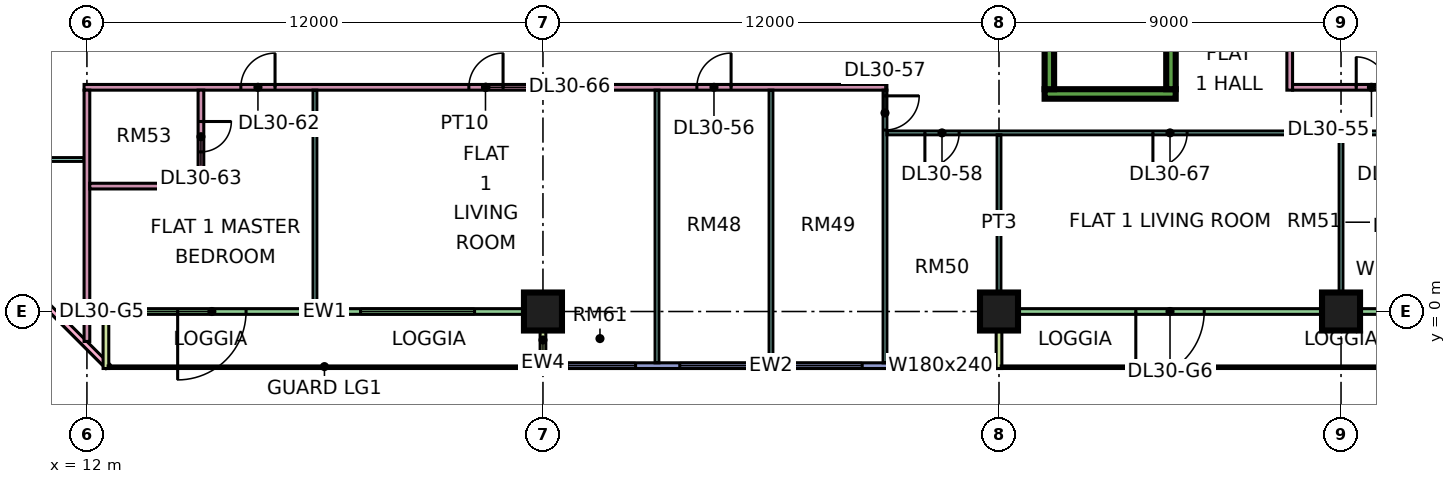
"""IFC4 building model, lengths in metres.
Left out: names, types, materials, properties, quantities, classifications, styles, units other than length and angle.
Written with IfcOpenShell. Run it as: python <this file> out.ifc"""

import sys

from ifc_helpers import new_model, si_unit, direction, frame, frame_2d, origin, origin_2d, place, context, subcontext, project, spatial, rectangle, extrude, element, fill, save


model = new_model("IFC4")
c1 = context("Model", 3, precision=1e-05, world=origin(), true_north=direction((0.0, 1.0)))
c2 = subcontext(c1, "Body", "Model", "MODEL_VIEW")
j1 = project(units=[si_unit("LENGTHUNIT", "METRE"), si_unit("PLANEANGLEUNIT", "RADIAN")], contexts=[c1])
p1 = place(None, origin())
s1 = spatial("IfcSite", under=j1, at=p1, CompositionType="ELEMENT")
p2 = place(p1, origin())
s2 = spatial("IfcBuilding", under=s1, at=p2, CompositionType="ELEMENT")
p3 = place(p2, frame((0.0, 0.0, 129.4)))
s3 = spatial("IfcBuildingStorey", under=s2, at=p3, CompositionType="ELEMENT", Elevation=129.4)
for number, where, z_axis, x_axis in (
    (1, (24.0, 0.0, 0.0), (0.0, 0.0, 1.0), (1.0, 0.0, 0.0)),
    (2, (36.0, 0.0, 0.0), (0.0, 0.0, 1.0), (1.0, 0.0, 0.0)),
    (3, (45.0, 0.0, 0.0), (0.0, 0.0, 1.0), (1.0, 0.0, 0.0)),
):
    element("IfcColumn", number, at=place(p3, frame(where, z_axis=z_axis, x_axis=x_axis)), inside=s3, PredefinedType="COLUMN", context=c2, shape_type="SweptSolid", body=[
        extrude(rectangle(XDim=1.0, YDim=1.0, at=origin_2d()), origin(), (0.0, 0.0, 1.0), 3.75),
    ])
p4 = place(p3, frame((37.2, 5.725, 0.0), z_axis=(0.0, 0.0, 1.0), x_axis=(1.0, 0.0, 0.0)))
e4 = element("IfcWall", 4, at=p4, inside=s3, PredefinedType="SHEAR", context=c2, shape_type="SweptSolid", body=[
    extrude(rectangle(XDim=3.45, YDim=0.25, at=frame_2d((1.725, 0.0))), origin(), (0.0, 0.0, 1.0), 3.75),
])
for number, where, z_axis, x_axis in (
    (5, (37.325, 5.85, 0.0), (0.0, 0.0, 1.0), (0.0, 1.0, 0.0)),
    (6, (40.525, 5.85, 0.0), (0.0, 0.0, 1.0), (0.0, 1.0, 0.0)),
):
    element("IfcWall", number, at=place(p3, frame(where, z_axis=z_axis, x_axis=x_axis)), inside=s3, PredefinedType="SHEAR", context=c2, shape_type="SweptSolid", body=[
        extrude(rectangle(XDim=6.5, YDim=0.25, at=frame_2d((3.25, 0.0))), origin(), (0.0, 0.0, 1.0), 3.75),
    ])
p5 = place(p3, frame((-1.447, 12.553, 0.0), z_axis=(0.0, 0.0, 1.0), x_axis=(0.707106781187, -0.707106781187, 0.0)))
e7 = element("IfcWall", 7, at=p5, inside=s3, PredefinedType="SOLIDWALL", context=c2, shape_type="SweptSolid", body=[
    extrude(rectangle(XDim=19.799, YDim=0.15, at=frame_2d((9.899, 0.0))), origin(), (0.0, 0.0, 1.0), 3.35),
])
p6 = place(p5, frame((2.212, 0.0, 0.45)))
e8 = element("IfcOpeningElement", 8, at=p6, cuts=e7, PredefinedType="OPENING", context=c2, shape_type="SweptSolid", body=[
    extrude(rectangle(XDim=3.0, YDim=2.4, at=frame_2d((1.5, 1.2))), frame((0.0, 0.085, 0.0), z_axis=(0.0, -1.0, 0.0), x_axis=(1.0, 0.0, 0.0)), (0.0, 0.0, 1.0), 0.17),
])
p7 = place(p5, frame((10.216, 0.0, 0.45)))
e9 = element("IfcOpeningElement", 9, at=p7, cuts=e7, PredefinedType="OPENING", context=c2, shape_type="SweptSolid", body=[
    extrude(rectangle(XDim=3.0, YDim=2.4, at=frame_2d((1.5, 1.2))), frame((0.0, 0.085, 0.0), z_axis=(0.0, -1.0, 0.0), x_axis=(1.0, 0.0, 0.0)), (0.0, 0.0, 1.0), 0.17),
])
p8 = place(p3, frame((12.575, 0.0, 0.0), z_axis=(0.0, 0.0, 1.0), x_axis=(1.0, 0.0, 0.0)))
e10 = element("IfcWall", 10, at=p8, inside=s3, PredefinedType="SOLIDWALL", context=c2, shape_type="SweptSolid", body=[
    extrude(rectangle(XDim=11.35, YDim=0.15, at=frame_2d((5.675, 0.0))), origin(), (0.0, 0.0, 1.0), 3.35),
])
p9 = place(p8, frame((1.812, 0.0, 0.0)))
e11 = element("IfcOpeningElement", 11, at=p9, cuts=e10, PredefinedType="OPENING", context=c2, shape_type="SweptSolid", body=[
    extrude(rectangle(XDim=1.8, YDim=2.4, at=frame_2d((0.9, 1.2))), frame((0.0, 0.085, 0.0), z_axis=(0.0, -1.0, 0.0), x_axis=(1.0, 0.0, 0.0)), (0.0, 0.0, 1.0), 0.17),
])
p10 = place(p8, frame((6.625, 0.0, 0.45)))
e12 = element("IfcOpeningElement", 12, at=p10, cuts=e10, PredefinedType="OPENING", context=c2, shape_type="SweptSolid", body=[
    extrude(rectangle(XDim=3.0, YDim=2.4, at=frame_2d((1.5, 1.2))), frame((0.0, 0.085, 0.0), z_axis=(0.0, -1.0, 0.0), x_axis=(1.0, 0.0, 0.0)), (0.0, 0.0, 1.0), 0.17),
])
for number, where, z_axis, x_axis in (
    (13, (12.5, -1.5, 0.0), (0.0, 0.0, 1.0), (0.0, 1.0, 0.0)),
    (14, (24.0, -1.5, 0.0), (0.0, 0.0, 1.0), (0.0, 1.0, 0.0)),
):
    element("IfcWall", number, at=place(p3, frame(where, z_axis=z_axis, x_axis=x_axis)), inside=s3, PredefinedType="SOLIDWALL", context=c2, shape_type="SweptSolid", body=[
        extrude(rectangle(XDim=1.5, YDim=0.15, at=frame_2d((0.75, 0.0))), origin(), (0.0, 0.0, 1.0), 3.35),
    ])
p11 = place(p3, frame((24.075, -1.425, 0.0), z_axis=(0.0, 0.0, 1.0), x_axis=(1.0, 0.0, 0.0)))
e15 = element("IfcWall", 15, at=p11, inside=s3, PredefinedType="SOLIDWALL", context=c2, shape_type="SweptSolid", body=[
    extrude(rectangle(XDim=11.85, YDim=0.15, at=frame_2d((5.925, 0.0))), origin(), (0.0, 0.0, 1.0), 3.35),
])
p12 = place(p11, frame((0.562, 0.0, 0.45)))
e16 = element("IfcOpeningElement", 16, at=p12, cuts=e15, PredefinedType="OPENING", context=c2, shape_type="SweptSolid", body=[
    extrude(rectangle(XDim=1.8, YDim=2.4, at=frame_2d((0.9, 1.2))), frame((0.0, 0.085, 0.0), z_axis=(0.0, -1.0, 0.0), x_axis=(1.0, 0.0, 0.0)), (0.0, 0.0, 1.0), 0.17),
])
p13 = place(p11, frame((3.525, 0.0, 0.45)))
e17 = element("IfcOpeningElement", 17, at=p13, cuts=e15, PredefinedType="OPENING", context=c2, shape_type="SweptSolid", body=[
    extrude(rectangle(XDim=1.8, YDim=2.4, at=frame_2d((0.9, 1.2))), frame((0.0, 0.085, 0.0), z_axis=(0.0, -1.0, 0.0), x_axis=(1.0, 0.0, 0.0)), (0.0, 0.0, 1.0), 0.17),
])
p14 = place(p11, frame((6.525, 0.0, 0.45)))
e18 = element("IfcOpeningElement", 18, at=p14, cuts=e15, PredefinedType="OPENING", context=c2, shape_type="SweptSolid", body=[
    extrude(rectangle(XDim=1.8, YDim=2.4, at=frame_2d((0.9, 1.2))), frame((0.0, 0.085, 0.0), z_axis=(0.0, -1.0, 0.0), x_axis=(1.0, 0.0, 0.0)), (0.0, 0.0, 1.0), 0.17),
])
p15 = place(p11, frame((9.488, 0.0, 0.45)))
e19 = element("IfcOpeningElement", 19, at=p15, cuts=e15, PredefinedType="OPENING", context=c2, shape_type="SweptSolid", body=[
    extrude(rectangle(XDim=1.8, YDim=2.4, at=frame_2d((0.9, 1.2))), frame((0.0, 0.085, 0.0), z_axis=(0.0, -1.0, 0.0), x_axis=(1.0, 0.0, 0.0)), (0.0, 0.0, 1.0), 0.17),
])
p16 = place(p3, frame((36.075, 0.0, 0.0), z_axis=(0.0, 0.0, 1.0), x_axis=(1.0, 0.0, 0.0)))
e20 = element("IfcWall", 20, at=p16, inside=s3, PredefinedType="SOLIDWALL", context=c2, shape_type="SweptSolid", body=[
    extrude(rectangle(XDim=11.85, YDim=0.15, at=frame_2d((5.925, 0.0))), origin(), (0.0, 0.0, 1.0), 3.35),
])
p17 = place(p16, frame((3.525, 0.0, 0.0)))
e21 = element("IfcOpeningElement", 21, at=p17, cuts=e20, PredefinedType="OPENING", context=c2, shape_type="SweptSolid", body=[
    extrude(rectangle(XDim=1.8, YDim=2.4, at=frame_2d((0.9, 1.2))), frame((0.0, 0.085, 0.0), z_axis=(0.0, -1.0, 0.0), x_axis=(1.0, 0.0, 0.0)), (0.0, 0.0, 1.0), 0.17),
])
p18 = place(p16, frame((10.087, 0.0, 0.45)))
e22 = element("IfcOpeningElement", 22, at=p18, cuts=e20, PredefinedType="OPENING", context=c2, shape_type="SweptSolid", body=[
    extrude(rectangle(XDim=1.2, YDim=2.4, at=frame_2d((0.6, 1.2))), frame((0.0, 0.085, 0.0), z_axis=(0.0, -1.0, 0.0), x_axis=(1.0, 0.0, 0.0)), (0.0, 0.0, 1.0), 0.17),
])
p19 = place(p3, frame((36.0, -1.5, 0.0), z_axis=(0.0, 0.0, 1.0), x_axis=(0.0, 1.0, 0.0)))
e23 = element("IfcWall", 23, at=p19, inside=s3, PredefinedType="SOLIDWALL", context=c2, shape_type="SweptSolid", body=[
    extrude(rectangle(XDim=1.5, YDim=0.15, at=frame_2d((0.75, 0.0))), origin(), (0.0, 0.0, 1.0), 3.35),
])
p20 = place(p3, frame((9.05, 4.0, 0.0), z_axis=(0.0, 0.0, 1.0), x_axis=(1.0, 0.0, 0.0)))
e24 = element("IfcWall", 24, at=p20, inside=s3, PredefinedType="PARTITIONING", context=c2, shape_type="SweptSolid", body=[
    extrude(rectangle(XDim=2.875, YDim=0.1, at=frame_2d((1.438, 0.0))), origin(), (0.0, 0.0, 1.0), 3.35),
])
p21 = place(p3, frame((11.925, 5.9, 0.0), z_axis=(0.0, 0.0, 1.0), x_axis=(1.0, 0.0, 0.0)))
e25 = element("IfcWall", 25, at=p21, inside=s3, PredefinedType="PARTITIONING", context=c2, shape_type="SweptSolid", body=[
    extrude(rectangle(XDim=21.125, YDim=0.15, at=frame_2d((10.562, 0.0))), origin(), (0.0, 0.0, 1.0), 3.35),
])
p22 = place(p21, frame((16.125, 0.0, 0.0)))
e26 = element("IfcOpeningElement", 26, at=p22, cuts=e25, PredefinedType="OPENING", context=c2, shape_type="SweptSolid", body=[
    extrude(rectangle(XDim=0.9, YDim=2.1, at=frame_2d((0.45, 1.05))), frame((0.0, 0.085, 0.0), z_axis=(0.0, -1.0, 0.0), x_axis=(1.0, 0.0, 0.0)), (0.0, 0.0, 1.0), 0.17),
])
p23 = place(p21, frame((4.125, 0.0, 0.0)))
e27 = element("IfcOpeningElement", 27, at=p23, cuts=e25, PredefinedType="OPENING", context=c2, shape_type="SweptSolid", body=[
    extrude(rectangle(XDim=0.9, YDim=2.1, at=frame_2d((0.45, 1.05))), frame((0.0, 0.085, 0.0), z_axis=(0.0, -1.0, 0.0), x_axis=(1.0, 0.0, 0.0)), (0.0, 0.0, 1.0), 0.17),
])
p24 = place(p21, frame((10.125, 0.0, 0.0)))
e28 = element("IfcOpeningElement", 28, at=p24, cuts=e25, PredefinedType="OPENING", context=c2, shape_type="SweptSolid", body=[
    extrude(rectangle(XDim=0.9, YDim=2.1, at=frame_2d((0.45, 1.05))), frame((0.0, 0.085, 0.0), z_axis=(0.0, -1.0, 0.0), x_axis=(1.0, 0.0, 0.0)), (0.0, 0.0, 1.0), 0.17),
])
p25 = place(p3, frame((12.0, -0.788, 0.0), z_axis=(0.0, 0.0, 1.0), x_axis=(0.0, 1.0, 0.0)))
e29 = element("IfcWall", 29, at=p25, inside=s3, PredefinedType="PARTITIONING", context=c2, shape_type="SweptSolid", body=[
    extrude(rectangle(XDim=6.613, YDim=0.15, at=frame_2d((3.306, 0.0))), origin(), (0.0, 0.0, 1.0), 3.35),
])
p26 = place(p3, frame((12.075, 3.3, 0.0), z_axis=(0.0, 0.0, 1.0), x_axis=(1.0, 0.0, 0.0)))
e30 = element("IfcWall", 30, at=p26, inside=s3, PredefinedType="PARTITIONING", context=c2, shape_type="SweptSolid", body=[
    extrude(rectangle(XDim=3.0, YDim=0.15, at=frame_2d((1.5, 0.0))), origin(), (0.0, 0.0, 1.0), 3.35),
])
p27 = place(p3, frame((15.0, 3.375, 0.0), z_axis=(0.0, 0.0, 1.0), x_axis=(0.0, 1.0, 0.0)))
e31 = element("IfcWall", 31, at=p27, inside=s3, PredefinedType="PARTITIONING", context=c2, shape_type="SweptSolid", body=[
    extrude(rectangle(XDim=2.45, YDim=0.15, at=frame_2d((1.225, 0.0))), origin(), (0.0, 0.0, 1.0), 3.35),
])
p28 = place(p27, frame((0.825, 0.0, 0.0)))
e32 = element("IfcOpeningElement", 32, at=p28, cuts=e31, PredefinedType="OPENING", context=c2, shape_type="SweptSolid", body=[
    extrude(rectangle(XDim=0.8, YDim=2.1, at=frame_2d((0.4, 1.05))), frame((0.0, 0.085, 0.0), z_axis=(0.0, -1.0, 0.0), x_axis=(1.0, 0.0, 0.0)), (0.0, 0.0, 1.0), 0.17),
])
p29 = place(p3, frame((18.0, 0.074, 0.0), z_axis=(0.0, 0.0, 1.0), x_axis=(0.0, 1.0, 0.0)))
e33 = element("IfcWall", 33, at=p29, inside=s3, PredefinedType="PARTITIONING", context=c2, shape_type="SweptSolid", body=[
    extrude(rectangle(XDim=5.751, YDim=0.1, at=frame_2d((2.875, 0.0))), origin(), (0.0, 0.0, 1.0), 3.35),
])
p30 = place(p3, frame((27.0, -1.35, 0.0), z_axis=(0.0, 0.0, 1.0), x_axis=(0.0, 1.0, 0.0)))
e34 = element("IfcWall", 34, at=p30, inside=s3, PredefinedType="PARTITIONING", context=c2, shape_type="SweptSolid", body=[
    extrude(rectangle(XDim=7.175, YDim=0.1, at=frame_2d((3.587, 0.0))), origin(), (0.0, 0.0, 1.0), 3.35),
])
p31 = place(p3, frame((30.0, -1.351, 0.0), z_axis=(0.0, 0.0, 1.0), x_axis=(0.0, 1.0, 0.0)))
e35 = element("IfcWall", 35, at=p31, inside=s3, PredefinedType="PARTITIONING", context=c2, shape_type="SweptSolid", body=[
    extrude(rectangle(XDim=7.176, YDim=0.1, at=frame_2d((3.588, 0.0))), origin(), (0.0, 0.0, 1.0), 3.35),
])
p32 = place(p3, frame((33.0, -1.351, 0.0), z_axis=(0.0, 0.0, 1.0), x_axis=(0.0, 1.0, 0.0)))
e36 = element("IfcWall", 36, at=p32, inside=s3, PredefinedType="PARTITIONING", context=c2, shape_type="SweptSolid", body=[
    extrude(rectangle(XDim=7.176, YDim=0.1, at=frame_2d((3.588, 0.0))), origin(), (0.0, 0.0, 1.0), 3.35),
])
p33 = place(p32, frame((6.126, 0.0, 0.0)))
e37 = element("IfcOpeningElement", 37, at=p33, cuts=e36, PredefinedType="OPENING", context=c2, shape_type="SweptSolid", body=[
    extrude(rectangle(XDim=0.9, YDim=2.1, at=frame_2d((0.45, 1.05))), frame((0.0, 0.06, 0.0), z_axis=(0.0, -1.0, 0.0), x_axis=(1.0, 0.0, 0.0)), (0.0, 0.0, 1.0), 0.12),
])
p34 = place(p3, frame((33.05, 4.7, 0.0), z_axis=(0.0, 0.0, 1.0), x_axis=(1.0, 0.0, 0.0)))
e38 = element("IfcWall", 38, at=p34, inside=s3, PredefinedType="PARTITIONING", context=c2, shape_type="SweptSolid", body=[
    extrude(rectangle(XDim=14.85, YDim=0.1, at=frame_2d((7.425, 0.0))), origin(), (0.0, 0.0, 1.0), 3.35),
])
p35 = place(p34, frame((1.0, 0.0, 0.0)))
e39 = element("IfcOpeningElement", 39, at=p35, cuts=e38, PredefinedType="OPENING", context=c2, shape_type="SweptSolid", body=[
    extrude(rectangle(XDim=0.9, YDim=2.1, at=frame_2d((0.45, 1.05))), frame((0.0, 0.06, 0.0), z_axis=(0.0, -1.0, 0.0), x_axis=(1.0, 0.0, 0.0)), (0.0, 0.0, 1.0), 0.12),
])
p36 = place(p34, frame((13.0, 0.0, 0.0)))
e40 = element("IfcOpeningElement", 40, at=p36, cuts=e38, PredefinedType="OPENING", context=c2, shape_type="SweptSolid", body=[
    extrude(rectangle(XDim=0.9, YDim=2.1, at=frame_2d((0.45, 1.05))), frame((0.0, 0.06, 0.0), z_axis=(0.0, -1.0, 0.0), x_axis=(1.0, 0.0, 0.0)), (0.0, 0.0, 1.0), 0.12),
])
p37 = place(p34, frame((7.0, 0.0, 0.0)))
e41 = element("IfcOpeningElement", 41, at=p37, cuts=e38, PredefinedType="OPENING", context=c2, shape_type="SweptSolid", body=[
    extrude(rectangle(XDim=0.9, YDim=2.1, at=frame_2d((0.45, 1.05))), frame((0.0, 0.06, 0.0), z_axis=(0.0, -1.0, 0.0), x_axis=(1.0, 0.0, 0.0)), (0.0, 0.0, 1.0), 0.12),
])
p38 = place(p3, frame((36.0, 0.0, 0.0), z_axis=(0.0, 0.0, 1.0), x_axis=(0.0, 1.0, 0.0)))
e42 = element("IfcWall", 42, at=p38, inside=s3, PredefinedType="PARTITIONING", context=c2, shape_type="SweptSolid", body=[
    extrude(rectangle(XDim=4.65, YDim=0.1, at=frame_2d((2.325, 0.0))), origin(), (0.0, 0.0, 1.0), 3.35),
])
p39 = place(p3, frame((43.65, 5.825, 0.0), z_axis=(0.0, 0.0, 1.0), x_axis=(0.0, 1.0, 0.0)))
e43 = element("IfcWall", 43, at=p39, inside=s3, PredefinedType="PARTITIONING", context=c2, shape_type="SweptSolid", body=[
    extrude(rectangle(XDim=6.575, YDim=0.15, at=frame_2d((3.288, 0.0))), origin(), (0.0, 0.0, 1.0), 3.35),
])
p40 = place(p39, frame((4.425, 0.0, 0.0)))
e44 = element("IfcOpeningElement", 44, at=p40, cuts=e43, PredefinedType="OPENING", context=c2, shape_type="SweptSolid", body=[
    extrude(rectangle(XDim=0.9, YDim=2.1, at=frame_2d((0.45, 1.05))), frame((0.0, 0.085, 0.0), z_axis=(0.0, -1.0, 0.0), x_axis=(1.0, 0.0, 0.0)), (0.0, 0.0, 1.0), 0.17),
])
p41 = place(p3, frame((43.725, 5.9, 0.0), z_axis=(0.0, 0.0, 1.0), x_axis=(1.0, 0.0, 0.0)))
e45 = element("IfcWall", 45, at=p41, inside=s3, PredefinedType="PARTITIONING", context=c2, shape_type="SweptSolid", body=[
    extrude(rectangle(XDim=4.175, YDim=0.15, at=frame_2d((2.087, 0.0))), origin(), (0.0, 0.0, 1.0), 3.35),
])
p42 = place(p41, frame((1.675, 0.0, 0.0)))
e46 = element("IfcOpeningElement", 46, at=p42, cuts=e45, PredefinedType="OPENING", context=c2, shape_type="SweptSolid", body=[
    extrude(rectangle(XDim=0.8, YDim=2.1, at=frame_2d((0.4, 1.05))), frame((0.0, 0.085, 0.0), z_axis=(0.0, -1.0, 0.0), x_axis=(1.0, 0.0, 0.0)), (0.0, 0.0, 1.0), 0.17),
])
p43 = place(p3, frame((45.0, 0.074, 0.0), z_axis=(0.0, 0.0, 1.0), x_axis=(0.0, 1.0, 0.0)))
e47 = element("IfcWall", 47, at=p43, inside=s3, PredefinedType="PARTITIONING", context=c2, shape_type="SweptSolid", body=[
    extrude(rectangle(XDim=4.576, YDim=0.1, at=frame_2d((2.288, 0.0))), origin(), (0.0, 0.0, 1.0), 3.35),
])
p44 = place(p9, frame((1.8, 0.0, 0.0), z_axis=(0.0, 0.0, 1.0), x_axis=(-1.0, 0.0, 0.0)))
e48 = element("IfcDoor", 48, at=p44, inside=s3, OperationType="DOUBLE_DOOR_SINGLE_SWING", PredefinedType="DOOR", context=c2, shape_type="SweptSolid", body=[
    extrude(rectangle(XDim=1.8, YDim=2.4, at=frame_2d((0.9, 1.2))), frame((0.0, 0.025, 0.0), z_axis=(0.0, -1.0, 0.0), x_axis=(1.0, 0.0, 0.0)), (0.0, 0.0, 1.0), 0.05),
])
fill(e11, e48)
p45 = place(p10, origin())
e49 = element("IfcWindow", 49, at=p45, inside=s3, PartitioningType="SINGLE_PANEL", PredefinedType="WINDOW", context=c2, shape_type="SweptSolid", body=[
    extrude(rectangle(XDim=3.0, YDim=2.4, at=frame_2d((1.5, 1.2))), frame((0.0, 0.03, 0.0), z_axis=(0.0, -1.0, 0.0), x_axis=(1.0, 0.0, 0.0)), (0.0, 0.0, 1.0), 0.06),
])
fill(e12, e49)
p46 = place(p12, origin())
e50 = element("IfcWindow", 50, at=p46, inside=s3, PartitioningType="SINGLE_PANEL", PredefinedType="WINDOW", context=c2, shape_type="SweptSolid", body=[
    extrude(rectangle(XDim=1.8, YDim=2.4, at=frame_2d((0.9, 1.2))), frame((0.0, 0.03, 0.0), z_axis=(0.0, -1.0, 0.0), x_axis=(1.0, 0.0, 0.0)), (0.0, 0.0, 1.0), 0.06),
])
fill(e16, e50)
p47 = place(p13, origin())
e51 = element("IfcWindow", 51, at=p47, inside=s3, PartitioningType="SINGLE_PANEL", PredefinedType="WINDOW", context=c2, shape_type="SweptSolid", body=[
    extrude(rectangle(XDim=1.8, YDim=2.4, at=frame_2d((0.9, 1.2))), frame((0.0, 0.03, 0.0), z_axis=(0.0, -1.0, 0.0), x_axis=(1.0, 0.0, 0.0)), (0.0, 0.0, 1.0), 0.06),
])
fill(e17, e51)
p48 = place(p14, origin())
e52 = element("IfcWindow", 52, at=p48, inside=s3, PartitioningType="SINGLE_PANEL", PredefinedType="WINDOW", context=c2, shape_type="SweptSolid", body=[
    extrude(rectangle(XDim=1.8, YDim=2.4, at=frame_2d((0.9, 1.2))), frame((0.0, 0.03, 0.0), z_axis=(0.0, -1.0, 0.0), x_axis=(1.0, 0.0, 0.0)), (0.0, 0.0, 1.0), 0.06),
])
fill(e18, e52)
p49 = place(p15, origin())
e53 = element("IfcWindow", 53, at=p49, inside=s3, PartitioningType="SINGLE_PANEL", PredefinedType="WINDOW", context=c2, shape_type="SweptSolid", body=[
    extrude(rectangle(XDim=1.8, YDim=2.4, at=frame_2d((0.9, 1.2))), frame((0.0, 0.03, 0.0), z_axis=(0.0, -1.0, 0.0), x_axis=(1.0, 0.0, 0.0)), (0.0, 0.0, 1.0), 0.06),
])
fill(e19, e53)
p50 = place(p17, frame((1.8, 0.0, 0.0), z_axis=(0.0, 0.0, 1.0), x_axis=(-1.0, 0.0, 0.0)))
e54 = element("IfcDoor", 54, at=p50, inside=s3, OperationType="DOUBLE_DOOR_SINGLE_SWING", PredefinedType="DOOR", context=c2, shape_type="SweptSolid", body=[
    extrude(rectangle(XDim=1.8, YDim=2.4, at=frame_2d((0.9, 1.2))), frame((0.0, 0.025, 0.0), z_axis=(0.0, -1.0, 0.0), x_axis=(1.0, 0.0, 0.0)), (0.0, 0.0, 1.0), 0.05),
])
fill(e21, e54)
p51 = place(p42, origin())
e55 = element("IfcDoor", 55, at=p51, inside=s3, OperationType="SINGLE_SWING_LEFT", PredefinedType="DOOR", context=c2, shape_type="SweptSolid", body=[
    extrude(rectangle(XDim=0.8, YDim=2.1, at=frame_2d((0.4, 1.05))), frame((0.0, 0.025, 0.0), z_axis=(0.0, -1.0, 0.0), x_axis=(1.0, 0.0, 0.0)), (0.0, 0.0, 1.0), 0.05),
])
fill(e46, e55)
p52 = place(p22, frame((0.9, 0.0, 0.0), z_axis=(0.0, 0.0, 1.0), x_axis=(-1.0, 0.0, 0.0)))
e56 = element("IfcDoor", 56, at=p52, inside=s3, OperationType="SINGLE_SWING_RIGHT", PredefinedType="DOOR", context=c2, shape_type="SweptSolid", body=[
    extrude(rectangle(XDim=0.9, YDim=2.1, at=frame_2d((0.45, 1.05))), frame((0.0, 0.025, 0.0), z_axis=(0.0, -1.0, 0.0), x_axis=(1.0, 0.0, 0.0)), (0.0, 0.0, 1.0), 0.05),
])
fill(e26, e56)
p53 = place(p33, origin())
e57 = element("IfcDoor", 57, at=p53, inside=s3, OperationType="SINGLE_SWING_RIGHT", PredefinedType="DOOR", context=c2, shape_type="SweptSolid", body=[
    extrude(rectangle(XDim=0.9, YDim=2.1, at=frame_2d((0.45, 1.05))), frame((0.0, 0.025, 0.0), z_axis=(0.0, -1.0, 0.0), x_axis=(1.0, 0.0, 0.0)), (0.0, 0.0, 1.0), 0.05),
])
fill(e37, e57)
p54 = place(p35, frame((0.9, 0.0, 0.0), z_axis=(0.0, 0.0, 1.0), x_axis=(-1.0, 0.0, 0.0)))
e58 = element("IfcDoor", 58, at=p54, inside=s3, OperationType="SINGLE_SWING_LEFT", PredefinedType="DOOR", context=c2, shape_type="SweptSolid", body=[
    extrude(rectangle(XDim=0.9, YDim=2.1, at=frame_2d((0.45, 1.05))), frame((0.0, 0.025, 0.0), z_axis=(0.0, -1.0, 0.0), x_axis=(1.0, 0.0, 0.0)), (0.0, 0.0, 1.0), 0.05),
])
fill(e39, e58)
p55 = place(p23, frame((0.9, 0.0, 0.0), z_axis=(0.0, 0.0, 1.0), x_axis=(-1.0, 0.0, 0.0)))
e59 = element("IfcDoor", 59, at=p55, inside=s3, OperationType="SINGLE_SWING_RIGHT", PredefinedType="DOOR", context=c2, shape_type="SweptSolid", body=[
    extrude(rectangle(XDim=0.9, YDim=2.1, at=frame_2d((0.45, 1.05))), frame((0.0, 0.025, 0.0), z_axis=(0.0, -1.0, 0.0), x_axis=(1.0, 0.0, 0.0)), (0.0, 0.0, 1.0), 0.05),
])
fill(e27, e59)
p56 = place(p28, origin())
e60 = element("IfcDoor", 60, at=p56, inside=s3, OperationType="SINGLE_SWING_RIGHT", PredefinedType="DOOR", context=c2, shape_type="SweptSolid", body=[
    extrude(rectangle(XDim=0.8, YDim=2.1, at=frame_2d((0.4, 1.05))), frame((0.0, 0.025, 0.0), z_axis=(0.0, -1.0, 0.0), x_axis=(1.0, 0.0, 0.0)), (0.0, 0.0, 1.0), 0.05),
])
fill(e32, e60)
p57 = place(p24, frame((0.9, 0.0, 0.0), z_axis=(0.0, 0.0, 1.0), x_axis=(-1.0, 0.0, 0.0)))
e61 = element("IfcDoor", 61, at=p57, inside=s3, OperationType="SINGLE_SWING_RIGHT", PredefinedType="DOOR", context=c2, shape_type="SweptSolid", body=[
    extrude(rectangle(XDim=0.9, YDim=2.1, at=frame_2d((0.45, 1.05))), frame((0.0, 0.025, 0.0), z_axis=(0.0, -1.0, 0.0), x_axis=(1.0, 0.0, 0.0)), (0.0, 0.0, 1.0), 0.05),
])
fill(e28, e61)
p58 = place(p37, frame((0.9, 0.0, 0.0), z_axis=(0.0, 0.0, 1.0), x_axis=(-1.0, 0.0, 0.0)))
e62 = element("IfcDoor", 62, at=p58, inside=s3, OperationType="SINGLE_SWING_LEFT", PredefinedType="DOOR", context=c2, shape_type="SweptSolid", body=[
    extrude(rectangle(XDim=0.9, YDim=2.1, at=frame_2d((0.45, 1.05))), frame((0.0, 0.025, 0.0), z_axis=(0.0, -1.0, 0.0), x_axis=(1.0, 0.0, 0.0)), (0.0, 0.0, 1.0), 0.05),
])
fill(e41, e62)
save(model, sys.argv[1])
